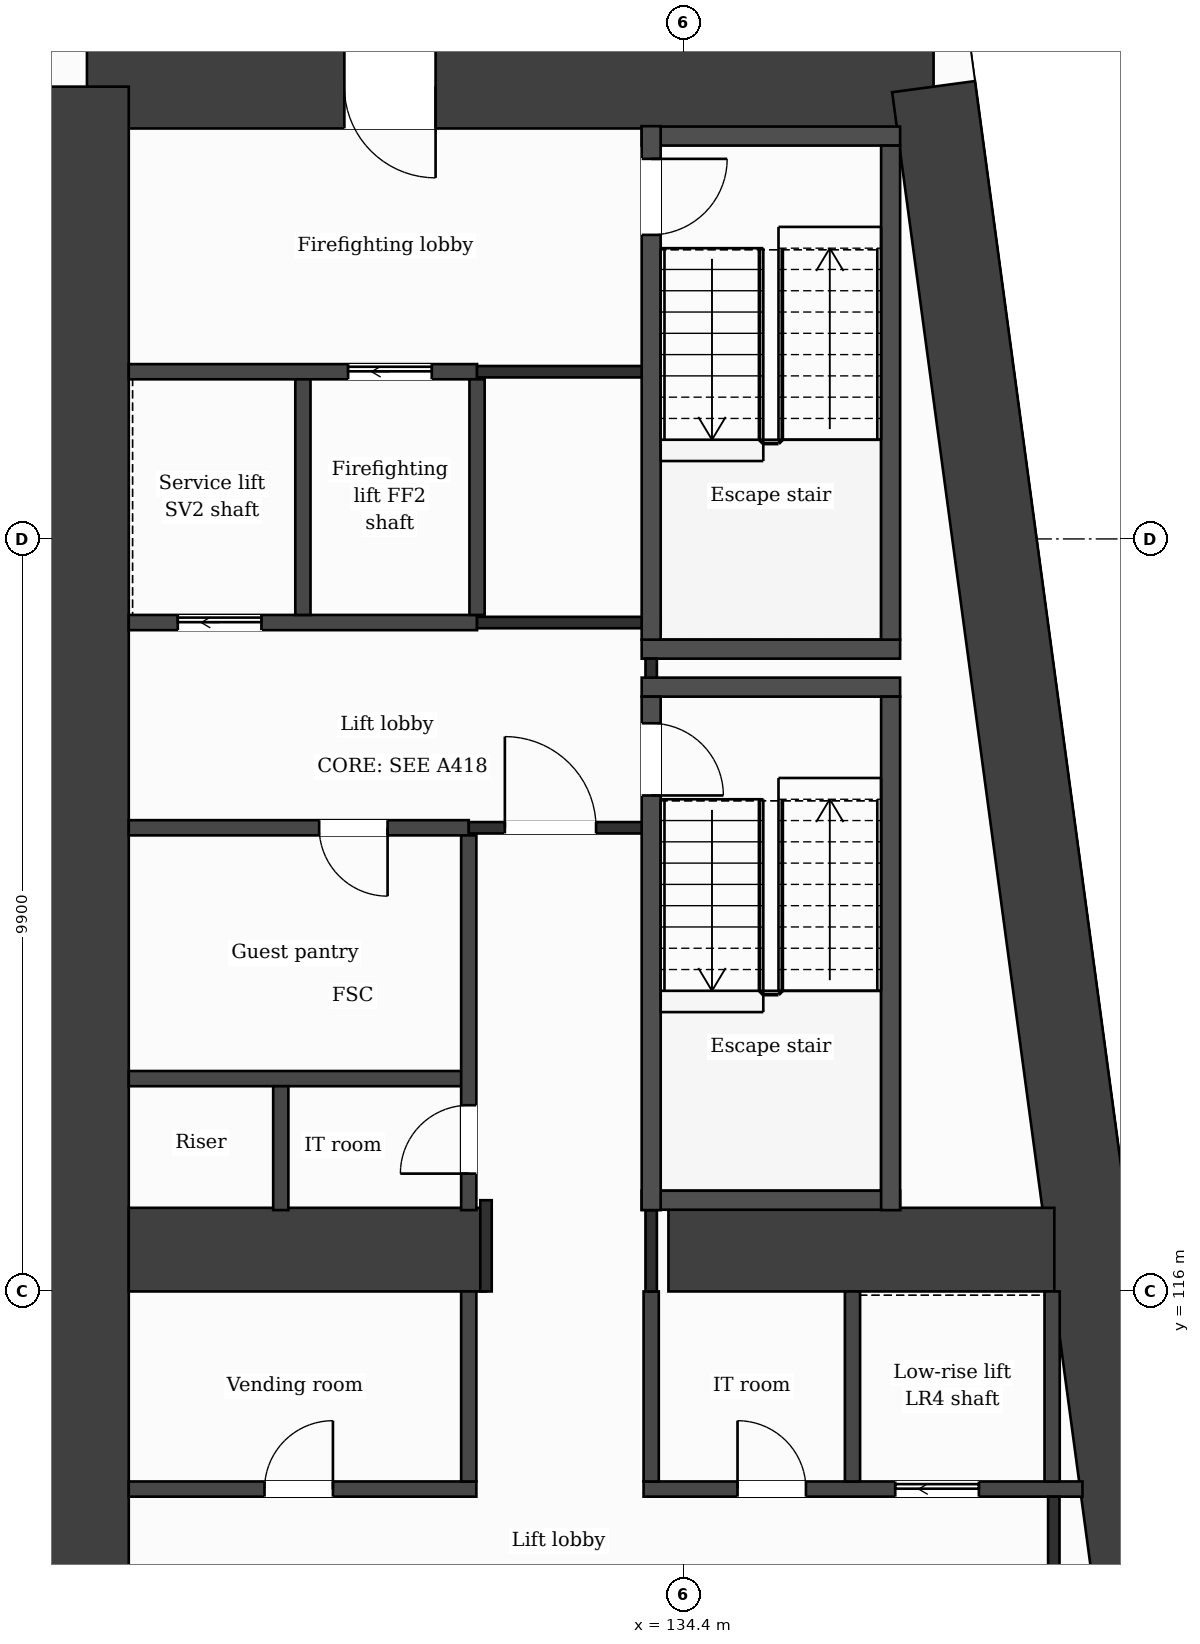
"""IFC4 building model, lengths in metres.
Left out: names, types, materials, properties, quantities, classifications, styles, units other than length and angle.
Written with IfcOpenShell. Run it as: python <this file> out.ifc"""

import sys

from ifc_helpers import new_model, si_unit, direction, frame, frame_2d, origin, place, context, subcontext, project, spatial, rectangle, extrude, element, fill, save


model = new_model("IFC4")
c1 = context("Model", 3, precision=1e-05, world=origin(), true_north=direction((0.0, 1.0)))
c2 = subcontext(c1, "Body", "Model", "MODEL_VIEW")
j1 = project(units=[si_unit("LENGTHUNIT", "METRE"), si_unit("PLANEANGLEUNIT", "RADIAN")], contexts=[c1])
p1 = place(None, origin())
s1 = spatial("IfcSite", under=j1, at=p1, CompositionType="ELEMENT")
p2 = place(p1, origin())
s2 = spatial("IfcBuilding", under=s1, at=p2, CompositionType="ELEMENT")
p3 = place(p2, frame((0.0, 0.0, 77.5)))
s3 = spatial("IfcBuildingStorey", under=s2, at=p3, CompositionType="ELEMENT", Elevation=77.5)
p4 = place(p3, frame((126.55, 131.85, 0.0), z_axis=(0.0, 0.0, 1.0), x_axis=(1.0, 0.0, 0.0)))
e1 = element("IfcWall", 1, at=p4, inside=s3, PredefinedType="SHEAR", context=c2, shape_type="SweptSolid", body=[
    extrude(rectangle(XDim=11.138, YDim=1.1, at=frame_2d((5.569, 0.0))), origin(), (0.0, 0.0, 1.0), 3.5),
])
p5 = place(p4, frame((3.386, 0.0, 0.0)))
e2 = element("IfcOpeningElement", 2, at=p5, cuts=e1, PredefinedType="OPENING", context=c2, shape_type="SweptSolid", body=[
    extrude(rectangle(XDim=1.2, YDim=2.1, at=frame_2d((0.6, 1.05))), frame((0.0, 0.56, 0.0), z_axis=(0.0, -1.0, 0.0), x_axis=(1.0, 0.0, 0.0)), (0.0, 0.0, 1.0), 1.12),
])
p6 = place(p3, frame((137.688, 131.85, 0.0), z_axis=(0.0, 0.0, 1.0), x_axis=(0.133411793472, -0.991060691059, 0.0)))
e3 = element("IfcWall", 3, at=p6, inside=s3, PredefinedType="SHEAR", context=c2, shape_type="SweptSolid", body=[
    extrude(rectangle(XDim=21.089, YDim=1.1, at=frame_2d((10.544, 0.0))), origin(), (0.0, 0.0, 1.0), 3.5),
])
p7 = place(p3, frame((126.55, 110.95, 0.0), z_axis=(0.0, 0.0, 1.0), x_axis=(0.0, 1.0, 0.0)))
e4 = element("IfcWall", 4, at=p7, inside=s3, PredefinedType="SHEAR", context=c2, shape_type="SweptSolid", body=[
    extrude(rectangle(XDim=20.9, YDim=1.1, at=frame_2d((10.45, 0.0))), origin(), (0.0, 0.0, 1.0), 3.5),
])
p8 = place(p3, frame((127.1, 116.55, 0.0), z_axis=(0.0, 0.0, 1.0), x_axis=(1.0, 0.0, 0.0)))
e5 = element("IfcWall", 5, at=p8, inside=s3, PredefinedType="SHEAR", context=c2, shape_type="SweptSolid", body=[
    extrude(rectangle(XDim=4.7, YDim=1.1, at=frame_2d((2.35, 0.0))), origin(), (0.0, 0.0, 1.0), 3.5),
])
p9 = place(p3, frame((134.2, 116.55, 0.0), z_axis=(0.0, 0.0, 1.0), x_axis=(1.0, 0.0, 0.0)))
e6 = element("IfcWall", 6, at=p9, inside=s3, PredefinedType="SHEAR", context=c2, shape_type="SweptSolid", body=[
    extrude(rectangle(XDim=5.077, YDim=1.1, at=frame_2d((2.539, 0.0))), origin(), (0.0, 0.0, 1.0), 3.5),
])
p10 = place(p3, frame((127.1, 113.4, 0.0), z_axis=(0.0, 0.0, 1.0), x_axis=(1.0, 0.0, 0.0)))
e7 = element("IfcWall", 7, at=p10, inside=s3, PredefinedType="PARTITIONING", context=c2, shape_type="SweptSolid", body=[
    extrude(rectangle(XDim=4.573, YDim=0.2, at=frame_2d((2.287, 0.0))), origin(), (0.0, 0.0, 1.0), 3.0),
])
p11 = place(p10, frame((1.786, 0.0, 0.0)))
e8 = element("IfcOpeningElement", 8, at=p11, cuts=e7, PredefinedType="OPENING", context=c2, shape_type="SweptSolid", body=[
    extrude(rectangle(XDim=0.9, YDim=2.1, at=frame_2d((0.45, 1.05))), frame((0.0, 0.11, 0.0), z_axis=(0.0, -1.0, 0.0), x_axis=(1.0, 0.0, 0.0)), (0.0, 0.0, 1.0), 0.22),
])
p12 = place(p3, frame((133.873, 113.4, 0.0), z_axis=(0.0, 0.0, 1.0), x_axis=(1.0, 0.0, 0.0)))
e9 = element("IfcWall", 9, at=p12, inside=s3, PredefinedType="PARTITIONING", context=c2, shape_type="SweptSolid", body=[
    extrude(rectangle(XDim=5.774, YDim=0.2, at=frame_2d((2.887, 0.0))), origin(), (0.0, 0.0, 1.0), 3.0),
])
p13 = place(p12, frame((3.311, 0.0, 0.0)))
e10 = element("IfcOpeningElement", 10, at=p13, cuts=e9, PredefinedType="OPENING", context=c2, shape_type="SweptSolid", body=[
    extrude(rectangle(XDim=1.1, YDim=2.1, at=frame_2d((0.55, 1.05))), frame((0.0, 0.11, 0.0), z_axis=(0.0, -1.0, 0.0), x_axis=(1.0, 0.0, 0.0)), (0.0, 0.0, 1.0), 0.22),
])
p14 = place(p12, frame((1.236, 0.0, 0.0)))
e11 = element("IfcOpeningElement", 11, at=p14, cuts=e9, PredefinedType="OPENING", context=c2, shape_type="SweptSolid", body=[
    extrude(rectangle(XDim=0.9, YDim=2.1, at=frame_2d((0.45, 1.05))), frame((0.0, 0.11, 0.0), z_axis=(0.0, -1.0, 0.0), x_axis=(1.0, 0.0, 0.0)), (0.0, 0.0, 1.0), 0.22),
])
p15 = place(p3, frame((133.848, 117.2, 0.0), z_axis=(0.0, 0.0, 1.0), x_axis=(1.0, 0.0, 0.0)))
e12 = element("IfcWall", 12, at=p15, inside=s3, PredefinedType="PARTITIONING", context=c2, shape_type="SweptSolid", body=[
    extrude(rectangle(XDim=3.4, YDim=0.25, at=frame_2d((1.7, 0.0))), origin(), (0.0, 0.0, 1.0), 3.0),
])
p16 = place(p3, frame((127.1, 118.8, 0.0), z_axis=(0.0, 0.0, 1.0), x_axis=(1.0, 0.0, 0.0)))
e13 = element("IfcWall", 13, at=p16, inside=s3, PredefinedType="PARTITIONING", context=c2, shape_type="SweptSolid", body=[
    extrude(rectangle(XDim=4.473, YDim=0.2, at=frame_2d((2.236, 0.0))), origin(), (0.0, 0.0, 1.0), 3.0),
])
p17 = place(p3, frame((127.1, 122.1, 0.0), z_axis=(0.0, 0.0, 1.0), x_axis=(1.0, 0.0, 0.0)))
e14 = element("IfcWall", 14, at=p17, inside=s3, PredefinedType="PARTITIONING", context=c2, shape_type="SweptSolid", body=[
    extrude(rectangle(XDim=4.473, YDim=0.2, at=frame_2d((2.236, 0.0))), origin(), (0.0, 0.0, 1.0), 3.0),
])
p18 = place(p17, frame((2.505, 0.0, 0.0)))
e15 = element("IfcOpeningElement", 15, at=p18, cuts=e14, PredefinedType="OPENING", context=c2, shape_type="SweptSolid", body=[
    extrude(rectangle(XDim=0.9, YDim=2.1, at=frame_2d((0.45, 1.05))), frame((0.0, 0.11, 0.0), z_axis=(0.0, -1.0, 0.0), x_axis=(1.0, 0.0, 0.0)), (0.0, 0.0, 1.0), 0.22),
])
p19 = place(p3, frame((131.573, 122.1, 0.0), z_axis=(0.0, 0.0, 1.0), x_axis=(1.0, 0.0, 0.0)))
e16 = element("IfcWall", 16, at=p19, inside=s3, PredefinedType="PARTITIONING", context=c2, shape_type="SweptSolid", body=[
    extrude(rectangle(XDim=2.4, YDim=0.15, at=frame_2d((1.2, 0.0))), origin(), (0.0, 0.0, 1.0), 3.0),
])
p20 = place(p19, frame((0.475, 0.0, 0.0)))
e17 = element("IfcOpeningElement", 17, at=p20, cuts=e16, PredefinedType="OPENING", context=c2, shape_type="SweptSolid", body=[
    extrude(rectangle(XDim=1.2, YDim=2.1, at=frame_2d((0.6, 1.05))), frame((0.0, 0.085, 0.0), z_axis=(0.0, -1.0, 0.0), x_axis=(1.0, 0.0, 0.0)), (0.0, 0.0, 1.0), 0.17),
])
for number, where, z_axis, x_axis in (
    (18, (133.848, 123.95, 0.0), (0.0, 0.0, 1.0), (1.0, 0.0, 0.0)),
    (19, (133.848, 124.45, 0.0), (0.0, 0.0, 1.0), (1.0, 0.0, 0.0)),
):
    element("IfcWall", number, at=place(p3, frame(where, z_axis=z_axis, x_axis=x_axis)), inside=s3, PredefinedType="PARTITIONING", context=c2, shape_type="SweptSolid", body=[
        extrude(rectangle(XDim=3.4, YDim=0.25, at=frame_2d((1.7, 0.0))), origin(), (0.0, 0.0, 1.0), 3.0),
    ])
p21 = place(p3, frame((127.1, 124.8, 0.0), z_axis=(0.0, 0.0, 1.0), x_axis=(1.0, 0.0, 0.0)))
e20 = element("IfcWall", 20, at=p21, inside=s3, PredefinedType="PARTITIONING", context=c2, shape_type="SweptSolid", body=[
    extrude(rectangle(XDim=4.582, YDim=0.2, at=frame_2d((2.291, 0.0))), origin(), (0.0, 0.0, 1.0), 3.0),
])
p22 = place(p21, frame((0.645, 0.0, 0.0)))
e21 = element("IfcOpeningElement", 21, at=p22, cuts=e20, PredefinedType="OPENING", context=c2, shape_type="SweptSolid", body=[
    extrude(rectangle(XDim=1.1, YDim=2.1, at=frame_2d((0.55, 1.05))), frame((0.0, 0.11, 0.0), z_axis=(0.0, -1.0, 0.0), x_axis=(1.0, 0.0, 0.0)), (0.0, 0.0, 1.0), 0.22),
])
p23 = place(p3, frame((131.682, 124.8, 0.0), z_axis=(0.0, 0.0, 1.0), x_axis=(1.0, 0.0, 0.0)))
e22 = element("IfcWall", 22, at=p23, inside=s3, PredefinedType="PARTITIONING", context=c2, shape_type="SweptSolid", body=[
    extrude(rectangle(XDim=2.416, YDim=0.15, at=frame_2d((1.208, 0.0))), origin(), (0.0, 0.0, 1.0), 3.0),
])
p24 = place(p3, frame((127.1, 128.1, 0.0), z_axis=(0.0, 0.0, 1.0), x_axis=(1.0, 0.0, 0.0)))
e23 = element("IfcWall", 23, at=p24, inside=s3, PredefinedType="PARTITIONING", context=c2, shape_type="SweptSolid", body=[
    extrude(rectangle(XDim=4.582, YDim=0.2, at=frame_2d((2.291, 0.0))), origin(), (0.0, 0.0, 1.0), 3.0),
])
p25 = place(p24, frame((2.886, 0.0, 0.0)))
e24 = element("IfcOpeningElement", 24, at=p25, cuts=e23, PredefinedType="OPENING", context=c2, shape_type="SweptSolid", body=[
    extrude(rectangle(XDim=1.1, YDim=2.1, at=frame_2d((0.55, 1.05))), frame((0.0, 0.11, 0.0), z_axis=(0.0, -1.0, 0.0), x_axis=(1.0, 0.0, 0.0)), (0.0, 0.0, 1.0), 0.22),
])
p26 = place(p3, frame((131.682, 128.1, 0.0), z_axis=(0.0, 0.0, 1.0), x_axis=(1.0, 0.0, 0.0)))
e25 = element("IfcWall", 25, at=p26, inside=s3, PredefinedType="PARTITIONING", context=c2, shape_type="SweptSolid", body=[
    extrude(rectangle(XDim=2.291, YDim=0.15, at=frame_2d((1.146, 0.0))), origin(), (0.0, 0.0, 1.0), 3.0),
])
p27 = place(p3, frame((133.848, 131.2, 0.0), z_axis=(0.0, 0.0, 1.0), x_axis=(1.0, 0.0, 0.0)))
e26 = element("IfcWall", 26, at=p27, inside=s3, PredefinedType="PARTITIONING", context=c2, shape_type="SweptSolid", body=[
    extrude(rectangle(XDim=3.4, YDim=0.25, at=frame_2d((1.7, 0.0))), origin(), (0.0, 0.0, 1.0), 3.0),
])
p28 = place(p3, frame((129.1, 117.07, 0.0), z_axis=(0.0, 0.0, 1.0), x_axis=(0.0, 1.0, 0.0)))
e27 = element("IfcWall", 27, at=p28, inside=s3, PredefinedType="PARTITIONING", context=c2, shape_type="SweptSolid", body=[
    extrude(rectangle(XDim=1.63, YDim=0.2, at=frame_2d((0.815, 0.0))), origin(), (0.0, 0.0, 1.0), 3.0),
])
p29 = place(p3, frame((129.391, 124.9, 0.0), z_axis=(0.0, 0.0, 1.0), x_axis=(0.0, 1.0, 0.0)))
e28 = element("IfcWall", 28, at=p29, inside=s3, PredefinedType="PARTITIONING", context=c2, shape_type="SweptSolid", body=[
    extrude(rectangle(XDim=3.1, YDim=0.2, at=frame_2d((1.55, 0.0))), origin(), (0.0, 0.0, 1.0), 3.0),
])
p30 = place(p3, frame((131.573, 113.5, 0.0), z_axis=(0.0, 0.0, 1.0), x_axis=(0.0, 1.0, 0.0)))
e29 = element("IfcWall", 29, at=p30, inside=s3, PredefinedType="PARTITIONING", context=c2, shape_type="SweptSolid", body=[
    extrude(rectangle(XDim=2.5, YDim=0.2, at=frame_2d((1.25, 0.0))), origin(), (0.0, 0.0, 1.0), 3.0),
])
p31 = place(p3, frame((131.573, 117.07, 0.0), z_axis=(0.0, 0.0, 1.0), x_axis=(0.0, 1.0, 0.0)))
e30 = element("IfcWall", 30, at=p31, inside=s3, PredefinedType="PARTITIONING", context=c2, shape_type="SweptSolid", body=[
    extrude(rectangle(XDim=4.93, YDim=0.2, at=frame_2d((2.465, 0.0))), origin(), (0.0, 0.0, 1.0), 3.0),
])
p32 = place(p31, frame((0.48, 0.0, 0.0)))
e31 = element("IfcOpeningElement", 31, at=p32, cuts=e30, PredefinedType="OPENING", context=c2, shape_type="SweptSolid", body=[
    extrude(rectangle(XDim=0.9, YDim=2.1, at=frame_2d((0.45, 1.05))), frame((0.0, 0.11, 0.0), z_axis=(0.0, -1.0, 0.0), x_axis=(1.0, 0.0, 0.0)), (0.0, 0.0, 1.0), 0.22),
])
p33 = place(p3, frame((131.682, 124.9, 0.0), z_axis=(0.0, 0.0, 1.0), x_axis=(0.0, 1.0, 0.0)))
e32 = element("IfcWall", 32, at=p33, inside=s3, PredefinedType="PARTITIONING", context=c2, shape_type="SweptSolid", body=[
    extrude(rectangle(XDim=3.1, YDim=0.2, at=frame_2d((1.55, 0.0))), origin(), (0.0, 0.0, 1.0), 3.0),
])
p34 = place(p3, frame((131.8, 116.0, 0.0), z_axis=(0.0, 0.0, 1.0), x_axis=(0.0, 1.0, 0.0)))
e33 = element("IfcWall", 33, at=p34, inside=s3, PredefinedType="PARTITIONING", context=c2, shape_type="SweptSolid", body=[
    extrude(rectangle(XDim=1.2, YDim=0.15, at=frame_2d((0.6, 0.0))), origin(), (0.0, 0.0, 1.0), 3.0),
])
p35 = place(p3, frame((133.973, 113.5, 0.0), z_axis=(0.0, 0.0, 1.0), x_axis=(0.0, 1.0, 0.0)))
e34 = element("IfcWall", 34, at=p35, inside=s3, PredefinedType="PARTITIONING", context=c2, shape_type="SweptSolid", body=[
    extrude(rectangle(XDim=2.5, YDim=0.2, at=frame_2d((1.25, 0.0))), origin(), (0.0, 0.0, 1.0), 3.0),
])
p36 = place(p3, frame((133.973, 116.0, 0.0), z_axis=(0.0, 0.0, 1.0), x_axis=(0.0, 1.0, 0.0)))
e35 = element("IfcWall", 35, at=p36, inside=s3, PredefinedType="PARTITIONING", context=c2, shape_type="SweptSolid", body=[
    extrude(rectangle(XDim=1.07, YDim=0.15, at=frame_2d((0.535, 0.0))), origin(), (0.0, 0.0, 1.0), 3.0),
])
p37 = place(p3, frame((133.973, 124.075, 0.0), z_axis=(0.0, 0.0, 1.0), x_axis=(0.0, 1.0, 0.0)))
e36 = element("IfcWall", 36, at=p37, inside=s3, PredefinedType="PARTITIONING", context=c2, shape_type="SweptSolid", body=[
    extrude(rectangle(XDim=0.25, YDim=0.15, at=frame_2d((0.125, 0.0))), origin(), (0.0, 0.0, 1.0), 3.0),
])
p38 = place(p3, frame((133.973, 117.07, 0.0), z_axis=(0.0, 0.0, 1.0), x_axis=(0.0, 1.0, 0.0)))
e37 = element("IfcWall", 37, at=p38, inside=s3, PredefinedType="PARTITIONING", context=c2, shape_type="SweptSolid", body=[
    extrude(rectangle(XDim=6.755, YDim=0.25, at=frame_2d((3.377, 0.0))), origin(), (0.0, 0.0, 1.0), 3.0),
])
p39 = place(p38, frame((5.455, 0.0, 0.0)))
e38 = element("IfcOpeningElement", 38, at=p39, cuts=e37, PredefinedType="OPENING", context=c2, shape_type="SweptSolid", body=[
    extrude(rectangle(XDim=0.95, YDim=2.1, at=frame_2d((0.475, 1.05))), frame((0.0, 0.135, 0.0), z_axis=(0.0, -1.0, 0.0), x_axis=(1.0, 0.0, 0.0)), (0.0, 0.0, 1.0), 0.27),
])
p40 = place(p3, frame((133.973, 124.575, 0.0), z_axis=(0.0, 0.0, 1.0), x_axis=(0.0, 1.0, 0.0)))
e39 = element("IfcWall", 39, at=p40, inside=s3, PredefinedType="PARTITIONING", context=c2, shape_type="SweptSolid", body=[
    extrude(rectangle(XDim=6.755, YDim=0.25, at=frame_2d((3.377, 0.0))), origin(), (0.0, 0.0, 1.0), 3.0),
])
p41 = place(p40, frame((5.325, 0.0, 0.0)))
e40 = element("IfcOpeningElement", 40, at=p41, cuts=e39, PredefinedType="OPENING", context=c2, shape_type="SweptSolid", body=[
    extrude(rectangle(XDim=1.0, YDim=2.1, at=frame_2d((0.5, 1.05))), frame((0.0, 0.135, 0.0), z_axis=(0.0, -1.0, 0.0), x_axis=(1.0, 0.0, 0.0)), (0.0, 0.0, 1.0), 0.27),
])
p42 = place(p3, frame((136.622, 113.5, 0.0), z_axis=(0.0, 0.0, 1.0), x_axis=(0.0, 1.0, 0.0)))
e41 = element("IfcWall", 41, at=p42, inside=s3, PredefinedType="PARTITIONING", context=c2, shape_type="SweptSolid", body=[
    extrude(rectangle(XDim=2.5, YDim=0.2, at=frame_2d((1.25, 0.0))), origin(), (0.0, 0.0, 1.0), 3.0),
])
p43 = place(p3, frame((137.123, 117.07, 0.0), z_axis=(0.0, 0.0, 1.0), x_axis=(0.0, 1.0, 0.0)))
e42 = element("IfcWall", 42, at=p43, inside=s3, PredefinedType="PARTITIONING", context=c2, shape_type="SweptSolid", body=[
    extrude(rectangle(XDim=6.755, YDim=0.25, at=frame_2d((3.377, 0.0))), origin(), (0.0, 0.0, 1.0), 3.0),
])
p44 = place(p3, frame((137.123, 124.575, 0.0), z_axis=(0.0, 0.0, 1.0), x_axis=(0.0, 1.0, 0.0)))
e43 = element("IfcWall", 43, at=p44, inside=s3, PredefinedType="PARTITIONING", context=c2, shape_type="SweptSolid", body=[
    extrude(rectangle(XDim=6.5, YDim=0.25, at=frame_2d((3.25, 0.0))), origin(), (0.0, 0.0, 1.0), 3.0),
])
p45 = place(p3, frame((139.248, 113.5, 0.0), z_axis=(0.0, 0.0, 1.0), x_axis=(0.0, 1.0, 0.0)))
e44 = element("IfcWall", 44, at=p45, inside=s3, PredefinedType="PARTITIONING", context=c2, shape_type="SweptSolid", body=[
    extrude(rectangle(XDim=2.5, YDim=0.2, at=frame_2d((1.25, 0.0))), origin(), (0.0, 0.0, 1.0), 3.0),
])
p46 = place(p3, frame((139.27, 111.5, 0.0), z_axis=(0.0, 0.0, 1.0), x_axis=(0.0, 1.0, 0.0)))
e45 = element("IfcWall", 45, at=p46, inside=s3, PredefinedType="PARTITIONING", context=c2, shape_type="SweptSolid", body=[
    extrude(rectangle(XDim=1.8, YDim=0.15, at=frame_2d((0.9, 0.0))), origin(), (0.0, 0.0, 1.0), 3.0),
])
p47 = place(p20, origin())
e46 = element("IfcDoor", 46, at=p47, inside=s3, OperationType="SINGLE_SWING_LEFT", PredefinedType="DOOR", context=c2, shape_type="SweptSolid", body=[
    extrude(rectangle(XDim=1.2, YDim=2.1, at=frame_2d((0.6, 1.05))), frame((0.0, 0.025, 0.0), z_axis=(0.0, -1.0, 0.0), x_axis=(1.0, 0.0, 0.0)), (0.0, 0.0, 1.0), 0.05),
])
fill(e17, e46)
p48 = place(p25, origin())
e47 = element("IfcDoor", 47, at=p48, inside=s3, OperationType="SLIDING_TO_LEFT", PredefinedType="DOOR", context=c2, shape_type="SweptSolid", body=[
    extrude(rectangle(XDim=1.1, YDim=2.1, at=frame_2d((0.55, 1.05))), frame((0.0, 0.025, 0.0), z_axis=(0.0, -1.0, 0.0), x_axis=(1.0, 0.0, 0.0)), (0.0, 0.0, 1.0), 0.05),
])
fill(e24, e47)
p49 = place(p22, origin())
e48 = element("IfcDoor", 48, at=p49, inside=s3, OperationType="SLIDING_TO_LEFT", PredefinedType="DOOR", context=c2, shape_type="SweptSolid", body=[
    extrude(rectangle(XDim=1.1, YDim=2.1, at=frame_2d((0.55, 1.05))), frame((0.0, 0.025, 0.0), z_axis=(0.0, -1.0, 0.0), x_axis=(1.0, 0.0, 0.0)), (0.0, 0.0, 1.0), 0.05),
])
fill(e21, e48)
p50 = place(p18, origin())
e49 = element("IfcDoor", 49, at=p50, inside=s3, OperationType="SINGLE_SWING_RIGHT", PredefinedType="DOOR", context=c2, shape_type="SweptSolid", body=[
    extrude(rectangle(XDim=0.9, YDim=2.1, at=frame_2d((0.45, 1.05))), frame((0.0, 0.025, 0.0), z_axis=(0.0, -1.0, 0.0), x_axis=(1.0, 0.0, 0.0)), (0.0, 0.0, 1.0), 0.05),
])
fill(e15, e49)
p51 = place(p39, origin())
e50 = element("IfcDoor", 50, at=p51, inside=s3, OperationType="SINGLE_SWING_LEFT", PredefinedType="DOOR", context=c2, shape_type="SweptSolid", body=[
    extrude(rectangle(XDim=0.95, YDim=2.1, at=frame_2d((0.475, 1.05))), frame((0.0, 0.025, 0.0), z_axis=(0.0, -1.0, 0.0), x_axis=(1.0, 0.0, 0.0)), (0.0, 0.0, 1.0), 0.05),
])
fill(e38, e50)
p52 = place(p41, origin())
e51 = element("IfcDoor", 51, at=p52, inside=s3, OperationType="SINGLE_SWING_RIGHT", PredefinedType="DOOR", context=c2, shape_type="SweptSolid", body=[
    extrude(rectangle(XDim=1.0, YDim=2.1, at=frame_2d((0.5, 1.05))), frame((0.0, 0.025, 0.0), z_axis=(0.0, -1.0, 0.0), x_axis=(1.0, 0.0, 0.0)), (0.0, 0.0, 1.0), 0.05),
])
fill(e40, e51)
p53 = place(p32, origin())
e52 = element("IfcDoor", 52, at=p53, inside=s3, OperationType="SINGLE_SWING_LEFT", PredefinedType="DOOR", context=c2, shape_type="SweptSolid", body=[
    extrude(rectangle(XDim=0.9, YDim=2.1, at=frame_2d((0.45, 1.05))), frame((0.0, 0.025, 0.0), z_axis=(0.0, -1.0, 0.0), x_axis=(1.0, 0.0, 0.0)), (0.0, 0.0, 1.0), 0.05),
])
fill(e31, e52)
p54 = place(p13, origin())
e53 = element("IfcDoor", 53, at=p54, inside=s3, OperationType="SLIDING_TO_LEFT", PredefinedType="DOOR", context=c2, shape_type="SweptSolid", body=[
    extrude(rectangle(XDim=1.1, YDim=2.1, at=frame_2d((0.55, 1.05))), frame((0.0, 0.025, 0.0), z_axis=(0.0, -1.0, 0.0), x_axis=(1.0, 0.0, 0.0)), (0.0, 0.0, 1.0), 0.05),
])
fill(e10, e53)
p55 = place(p14, origin())
e54 = element("IfcDoor", 54, at=p55, inside=s3, OperationType="SINGLE_SWING_LEFT", PredefinedType="DOOR", context=c2, shape_type="SweptSolid", body=[
    extrude(rectangle(XDim=0.9, YDim=2.1, at=frame_2d((0.45, 1.05))), frame((0.0, 0.025, 0.0), z_axis=(0.0, -1.0, 0.0), x_axis=(1.0, 0.0, 0.0)), (0.0, 0.0, 1.0), 0.05),
])
fill(e11, e54)
p56 = place(p11, origin())
e55 = element("IfcDoor", 55, at=p56, inside=s3, OperationType="SINGLE_SWING_RIGHT", PredefinedType="DOOR", context=c2, shape_type="SweptSolid", body=[
    extrude(rectangle(XDim=0.9, YDim=2.1, at=frame_2d((0.45, 1.05))), frame((0.0, 0.025, 0.0), z_axis=(0.0, -1.0, 0.0), x_axis=(1.0, 0.0, 0.0)), (0.0, 0.0, 1.0), 0.05),
])
fill(e8, e55)
p57 = place(p5, origin())
e56 = element("IfcDoor", 56, at=p57, inside=s3, OperationType="SINGLE_SWING_RIGHT", PredefinedType="DOOR", context=c2, shape_type="SweptSolid", body=[
    extrude(rectangle(XDim=1.2, YDim=2.1, at=frame_2d((0.6, 1.05))), frame((0.0, 0.025, 0.0), z_axis=(0.0, -1.0, 0.0), x_axis=(1.0, 0.0, 0.0)), (0.0, 0.0, 1.0), 0.05),
])
fill(e2, e56)
save(model, sys.argv[1])
